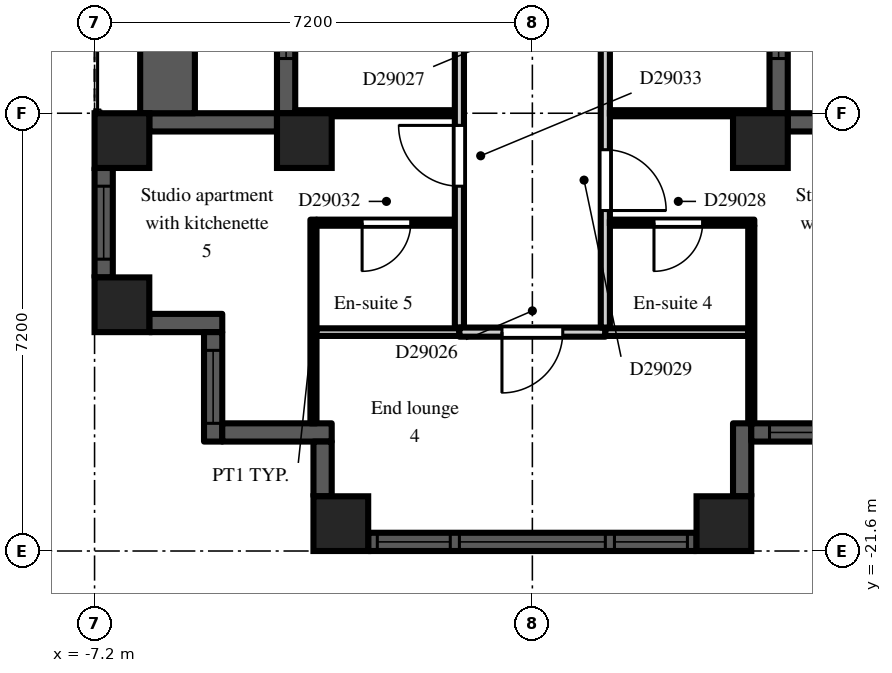
"""IFC4 building model, lengths in metres.
Left out: names, types, materials, properties, quantities, classifications, styles, units other than length and angle.
Written with IfcOpenShell. Run it as: python <this file> out.ifc"""

import sys

from ifc_helpers import new_model, si_unit, direction, frame, frame_2d, origin, origin_2d, place, context, subcontext, project, spatial, rectangle, extrude, element, fill, save


model = new_model("IFC4")
c1 = context("Model", 3, precision=1e-05, world=origin(), true_north=direction((0.0, 1.0)))
c2 = subcontext(c1, "Body", "Model", "MODEL_VIEW")
j1 = project(units=[si_unit("LENGTHUNIT", "METRE"), si_unit("PLANEANGLEUNIT", "RADIAN")], contexts=[c1])
p1 = place(None, origin())
s1 = spatial("IfcSite", under=j1, at=p1, CompositionType="ELEMENT")
p2 = place(p1, origin())
s2 = spatial("IfcBuilding", under=s1, at=p2, CompositionType="ELEMENT")
p3 = place(p2, frame((0.0, 0.0, 198.9)))
s3 = spatial("IfcBuildingStorey", under=s2, at=p3, CompositionType="ELEMENT", Elevation=198.9)
for number, where, z_axis, x_axis in (
    (1, (-6.75, -17.55, 0.0), (0.0, 0.0, 1.0), (1.0, 0.0, 0.0)),
    (2, (-6.75, -14.85, 0.0), (0.0, 0.0, 1.0), (1.0, 0.0, 0.0)),
    (3, (-3.75, -14.85, 0.0), (0.0, 0.0, 1.0), (1.0, 0.0, 0.0)),
    (4, (-3.15, -21.15, 0.0), (0.0, 0.0, 1.0), (1.0, 0.0, 0.0)),
    (5, (3.15, -21.15, 0.0), (0.0, 0.0, 1.0), (1.0, 0.0, 0.0)),
    (6, (3.75, -14.85, 0.0), (0.0, 0.0, 1.0), (1.0, 0.0, 0.0)),
):
    element("IfcColumn", number, at=place(p3, frame(where, z_axis=z_axis, x_axis=x_axis)), inside=s3, PredefinedType="COLUMN", context=c2, shape_type="SweptSolid", body=[
        extrude(rectangle(XDim=0.9, YDim=0.9, at=origin_2d()), origin(), (0.0, 0.0, 1.0), 3.0),
    ])
p4 = place(p3, frame((-4.05, -7.2, 0.0), z_axis=(0.0, 0.0, 1.0), x_axis=(0.0, -1.0, 0.0)))
e7 = element("IfcWall", 7, at=p4, inside=s3, PredefinedType="SOLIDWALL", context=c2, shape_type="SweptSolid", body=[
    extrude(rectangle(XDim=7.2, YDim=0.3, at=frame_2d((3.6, 0.0))), origin(), (0.0, 0.0, 1.0), 2.3),
])
p5 = place(p4, frame((3.0, 0.0, 0.0)))
e8 = element("IfcOpeningElement", 8, at=p5, cuts=e7, PredefinedType="OPENING", context=c2, shape_type="SweptSolid", body=[
    extrude(rectangle(XDim=1.2, YDim=2.05, at=frame_2d((0.6, 1.025))), frame((0.0, 0.16, 0.0), z_axis=(0.0, -1.0, 0.0), x_axis=(1.0, 0.0, 0.0)), (0.0, 0.0, 1.0), 0.32),
])
p6 = place(p4, frame((0.9, 0.0, 0.2)))
e9 = element("IfcOpeningElement", 9, at=p6, cuts=e7, PredefinedType="OPENING", context=c2, shape_type="SweptSolid", body=[
    extrude(rectangle(XDim=1.8, YDim=1.85, at=frame_2d((0.9, 0.925))), frame((0.0, 0.16, 0.0), z_axis=(0.0, -1.0, 0.0), x_axis=(1.0, 0.0, 0.0)), (0.0, 0.0, 1.0), 0.32),
])
p7 = place(p4, frame((4.5, 0.0, 0.2)))
e10 = element("IfcOpeningElement", 10, at=p7, cuts=e7, PredefinedType="OPENING", context=c2, shape_type="SweptSolid", body=[
    extrude(rectangle(XDim=1.8, YDim=1.85, at=frame_2d((0.9, 0.925))), frame((0.0, 0.16, 0.0), z_axis=(0.0, -1.0, 0.0), x_axis=(1.0, 0.0, 0.0)), (0.0, 0.0, 1.0), 0.32),
])
p8 = place(p3, frame((-4.2, -14.55, 0.0), z_axis=(0.0, 0.0, 1.0), x_axis=(-1.0, 0.0, 0.0)))
e11 = element("IfcWall", 11, at=p8, inside=s3, PredefinedType="SOLIDWALL", context=c2, shape_type="SweptSolid", body=[
    extrude(rectangle(XDim=2.1, YDim=0.3, at=frame_2d((1.05, 0.0))), origin(), (0.0, 0.0, 1.0), 2.3),
])
p9 = place(p3, frame((-7.05, -15.3, 0.0), z_axis=(0.0, 0.0, 1.0), x_axis=(0.0, -1.0, 0.0)))
e12 = element("IfcWall", 12, at=p9, inside=s3, PredefinedType="SOLIDWALL", context=c2, shape_type="SweptSolid", body=[
    extrude(rectangle(XDim=1.8, YDim=0.3, at=frame_2d((0.9, 0.0))), origin(), (0.0, 0.0, 1.0), 2.3),
])
p10 = place(p9, frame((0.3, 0.0, 0.2)))
e13 = element("IfcOpeningElement", 13, at=p10, cuts=e12, PredefinedType="OPENING", context=c2, shape_type="SweptSolid", body=[
    extrude(rectangle(XDim=1.2, YDim=1.85, at=frame_2d((0.6, 0.925))), frame((0.0, 0.16, 0.0), z_axis=(0.0, -1.0, 0.0), x_axis=(1.0, 0.0, 0.0)), (0.0, 0.0, 1.0), 0.32),
])
p11 = place(p3, frame((-6.3, -17.85, 0.0), z_axis=(0.0, 0.0, 1.0), x_axis=(1.0, 0.0, 0.0)))
e14 = element("IfcWall", 14, at=p11, inside=s3, PredefinedType="SOLIDWALL", context=c2, shape_type="SweptSolid", body=[
    extrude(rectangle(XDim=1.2, YDim=0.3, at=frame_2d((0.6, 0.0))), origin(), (0.0, 0.0, 1.0), 2.6),
])
p12 = place(p3, frame((-5.25, -18.0, 0.0), z_axis=(0.0, 0.0, 1.0), x_axis=(0.0, -1.0, 0.0)))
e15 = element("IfcWall", 15, at=p12, inside=s3, PredefinedType="SOLIDWALL", context=c2, shape_type="SweptSolid", body=[
    extrude(rectangle(XDim=1.8, YDim=0.3, at=frame_2d((0.9, 0.0))), origin(), (0.0, 0.0, 1.0), 2.6),
])
p13 = place(p12, frame((0.3, 0.0, 0.2)))
e16 = element("IfcOpeningElement", 16, at=p13, cuts=e15, PredefinedType="OPENING", context=c2, shape_type="SweptSolid", body=[
    extrude(rectangle(XDim=1.2, YDim=1.85, at=frame_2d((0.6, 0.925))), frame((0.0, 0.16, 0.0), z_axis=(0.0, -1.0, 0.0), x_axis=(1.0, 0.0, 0.0)), (0.0, 0.0, 1.0), 0.32),
])
p14 = place(p3, frame((-5.1, -19.65, 0.0), z_axis=(0.0, 0.0, 1.0), x_axis=(1.0, 0.0, 0.0)))
e17 = element("IfcWall", 17, at=p14, inside=s3, PredefinedType="SOLIDWALL", context=c2, shape_type="SweptSolid", body=[
    extrude(rectangle(XDim=1.8, YDim=0.3, at=frame_2d((0.9, 0.0))), origin(), (0.0, 0.0, 1.0), 2.6),
])
p15 = place(p3, frame((-3.45, -19.8, 0.0), z_axis=(0.0, 0.0, 1.0), x_axis=(0.0, -1.0, 0.0)))
e18 = element("IfcWall", 18, at=p15, inside=s3, PredefinedType="SOLIDWALL", context=c2, shape_type="SweptSolid", body=[
    extrude(rectangle(XDim=0.9, YDim=0.3, at=frame_2d((0.45, 0.0))), origin(), (0.0, 0.0, 1.0), 2.6),
])
p16 = place(p3, frame((-2.7, -21.45, 0.0), z_axis=(0.0, 0.0, 1.0), x_axis=(1.0, 0.0, 0.0)))
e19 = element("IfcWall", 19, at=p16, inside=s3, PredefinedType="SOLIDWALL", context=c2, shape_type="SweptSolid", body=[
    extrude(rectangle(XDim=5.4, YDim=0.3, at=frame_2d((2.7, 0.0))), origin(), (0.0, 0.0, 1.0), 2.3),
])
p17 = place(p16, frame((1.5, 0.0, 0.2)))
e20 = element("IfcOpeningElement", 20, at=p17, cuts=e19, PredefinedType="OPENING", context=c2, shape_type="SweptSolid", body=[
    extrude(rectangle(XDim=2.4, YDim=1.85, at=frame_2d((1.2, 0.925))), frame((0.0, 0.16, 0.0), z_axis=(0.0, -1.0, 0.0), x_axis=(1.0, 0.0, 0.0)), (0.0, 0.0, 1.0), 0.32),
])
p18 = place(p16, frame((0.15, 0.0, 0.2)))
e21 = element("IfcOpeningElement", 21, at=p18, cuts=e19, PredefinedType="OPENING", context=c2, shape_type="SweptSolid", body=[
    extrude(rectangle(XDim=1.2, YDim=1.85, at=frame_2d((0.6, 0.925))), frame((0.0, 0.16, 0.0), z_axis=(0.0, -1.0, 0.0), x_axis=(1.0, 0.0, 0.0)), (0.0, 0.0, 1.0), 0.32),
])
p19 = place(p16, frame((4.05, 0.0, 0.2)))
e22 = element("IfcOpeningElement", 22, at=p19, cuts=e19, PredefinedType="OPENING", context=c2, shape_type="SweptSolid", body=[
    extrude(rectangle(XDim=1.2, YDim=1.85, at=frame_2d((0.6, 0.925))), frame((0.0, 0.16, 0.0), z_axis=(0.0, -1.0, 0.0), x_axis=(1.0, 0.0, 0.0)), (0.0, 0.0, 1.0), 0.32),
])
p20 = place(p3, frame((3.45, -20.7, 0.0), z_axis=(0.0, 0.0, 1.0), x_axis=(0.0, 1.0, 0.0)))
e23 = element("IfcWall", 23, at=p20, inside=s3, PredefinedType="SOLIDWALL", context=c2, shape_type="SweptSolid", body=[
    extrude(rectangle(XDim=1.2, YDim=0.3, at=frame_2d((0.6, 0.0))), origin(), (0.0, 0.0, 1.0), 2.6),
])
p21 = place(p3, frame((3.6, -19.65, 0.0), z_axis=(0.0, 0.0, 1.0), x_axis=(1.0, 0.0, 0.0)))
e24 = element("IfcWall", 24, at=p21, inside=s3, PredefinedType="SOLIDWALL", context=c2, shape_type="SweptSolid", body=[
    extrude(rectangle(XDim=1.8, YDim=0.3, at=frame_2d((0.9, 0.0))), origin(), (0.0, 0.0, 1.0), 2.6),
])
p22 = place(p21, frame((0.3, 0.0, 0.2)))
e25 = element("IfcOpeningElement", 25, at=p22, cuts=e24, PredefinedType="OPENING", context=c2, shape_type="SweptSolid", body=[
    extrude(rectangle(XDim=1.2, YDim=1.85, at=frame_2d((0.6, 0.925))), frame((0.0, 0.16, 0.0), z_axis=(0.0, -1.0, 0.0), x_axis=(1.0, 0.0, 0.0)), (0.0, 0.0, 1.0), 0.32),
])
p23 = place(p3, frame((6.3, -14.55, 0.0), z_axis=(0.0, 0.0, 1.0), x_axis=(-1.0, 0.0, 0.0)))
e26 = element("IfcWall", 26, at=p23, inside=s3, PredefinedType="SOLIDWALL", context=c2, shape_type="SweptSolid", body=[
    extrude(rectangle(XDim=2.1, YDim=0.3, at=frame_2d((1.05, 0.0))), origin(), (0.0, 0.0, 1.0), 2.3),
])
p24 = place(p3, frame((4.05, -14.4, 0.0), z_axis=(0.0, 0.0, 1.0), x_axis=(0.0, 1.0, 0.0)))
e27 = element("IfcWall", 27, at=p24, inside=s3, PredefinedType="SOLIDWALL", context=c2, shape_type="SweptSolid", body=[
    extrude(rectangle(XDim=7.2, YDim=0.3, at=frame_2d((3.6, 0.0))), origin(), (0.0, 0.0, 1.0), 2.3),
])
p25 = place(p24, frame((3.0, 0.0, 0.0)))
e28 = element("IfcOpeningElement", 28, at=p25, cuts=e27, PredefinedType="OPENING", context=c2, shape_type="SweptSolid", body=[
    extrude(rectangle(XDim=1.2, YDim=2.05, at=frame_2d((0.6, 1.025))), frame((0.0, 0.16, 0.0), z_axis=(0.0, -1.0, 0.0), x_axis=(1.0, 0.0, 0.0)), (0.0, 0.0, 1.0), 0.32),
])
p26 = place(p24, frame((0.9, 0.0, 0.2)))
e29 = element("IfcOpeningElement", 29, at=p26, cuts=e27, PredefinedType="OPENING", context=c2, shape_type="SweptSolid", body=[
    extrude(rectangle(XDim=1.8, YDim=1.85, at=frame_2d((0.9, 0.925))), frame((0.0, 0.16, 0.0), z_axis=(0.0, -1.0, 0.0), x_axis=(1.0, 0.0, 0.0)), (0.0, 0.0, 1.0), 0.32),
])
p27 = place(p24, frame((4.5, 0.0, 0.2)))
e30 = element("IfcOpeningElement", 30, at=p27, cuts=e27, PredefinedType="OPENING", context=c2, shape_type="SweptSolid", body=[
    extrude(rectangle(XDim=1.8, YDim=1.85, at=frame_2d((0.9, 0.925))), frame((0.0, 0.16, 0.0), z_axis=(0.0, -1.0, 0.0), x_axis=(1.0, 0.0, 0.0)), (0.0, 0.0, 1.0), 0.32),
])
p28 = place(p3, frame((-6.0, -14.4, 0.0), z_axis=(0.0, 0.0, 1.0), x_axis=(0.0, 1.0, 0.0)))
e31 = element("IfcWall", 31, at=p28, inside=s3, PredefinedType="PARAPET", context=c2, shape_type="SweptSolid", body=[
    extrude(rectangle(XDim=7.2, YDim=0.9, at=frame_2d((3.6, 0.0))), origin(), (0.0, 0.0, 1.0), 0.8),
])
p29 = place(p3, frame((-3.9, -14.4, 0.0), z_axis=(0.0, 0.0, 1.0), x_axis=(1.0, 0.0, 0.0)))
e32 = element("IfcWall", 32, at=p29, inside=s3, PredefinedType="PARTITIONING", context=c2, shape_type="SweptSolid", body=[
    extrude(rectangle(XDim=2.625, YDim=0.1, at=frame_2d((1.312, 0.0))), origin(), (0.0, 0.0, 1.0), 2.6),
])
p30 = place(p3, frame((-3.6, -19.5, 0.0), z_axis=(0.0, 0.0, 1.0), x_axis=(0.0, 1.0, 0.0)))
e33 = element("IfcWall", 33, at=p30, inside=s3, PredefinedType="PARTITIONING", context=c2, shape_type="SweptSolid", body=[
    extrude(rectangle(XDim=3.35, YDim=0.1, at=frame_2d((1.675, 0.0))), origin(), (0.0, 0.0, 1.0), 2.6),
])
p31 = place(p3, frame((-3.55, -18.0, 0.0), z_axis=(0.0, 0.0, 1.0), x_axis=(1.0, 0.0, 0.0)))
e34 = element("IfcWall", 34, at=p31, inside=s3, PredefinedType="PARTITIONING", context=c2, shape_type="SweptSolid", body=[
    extrude(rectangle(XDim=2.35, YDim=0.125, at=frame_2d((1.175, 0.0))), origin(), (0.0, 0.0, 1.0), 2.6),
])
p32 = place(p3, frame((-3.55, -16.2, 0.0), z_axis=(0.0, 0.0, 1.0), x_axis=(1.0, 0.0, 0.0)))
e35 = element("IfcWall", 35, at=p32, inside=s3, PredefinedType="PARTITIONING", context=c2, shape_type="SweptSolid", body=[
    extrude(rectangle(XDim=2.275, YDim=0.1, at=frame_2d((1.138, 0.0))), origin(), (0.0, 0.0, 1.0), 2.6),
])
p33 = place(p32, frame((0.75, 0.0, 0.0)))
e36 = element("IfcOpeningElement", 36, at=p33, cuts=e35, PredefinedType="OPENING", context=c2, shape_type="SweptSolid", body=[
    extrude(rectangle(XDim=0.8, YDim=2.1, at=frame_2d((0.4, 1.05))), frame((0.0, 0.06, 0.0), z_axis=(0.0, -1.0, 0.0), x_axis=(1.0, 0.0, 0.0)), (0.0, 0.0, 1.0), 0.12),
])
p34 = place(p3, frame((-1.2, -17.925, 0.0), z_axis=(0.0, 0.0, 1.0), x_axis=(0.0, 1.0, 0.0)))
e37 = element("IfcWall", 37, at=p34, inside=s3, PredefinedType="PARTITIONING", context=c2, shape_type="SweptSolid", body=[
    extrude(rectangle(XDim=16.65, YDim=0.15, at=frame_2d((8.325, 0.0))), origin(), (0.0, 0.0, 1.0), 2.6),
])
p35 = place(p34, frame((12.175, 0.0, 0.0)))
e38 = element("IfcOpeningElement", 38, at=p35, cuts=e37, PredefinedType="OPENING", context=c2, shape_type="SweptSolid", body=[
    extrude(rectangle(XDim=0.9, YDim=2.1, at=frame_2d((0.45, 1.05))), frame((0.0, 0.085, 0.0), z_axis=(0.0, -1.0, 0.0), x_axis=(1.0, 0.0, 0.0)), (0.0, 0.0, 1.0), 0.17),
])
p36 = place(p34, frame((8.875, 0.0, 0.0)))
e39 = element("IfcOpeningElement", 39, at=p36, cuts=e37, PredefinedType="OPENING", context=c2, shape_type="SweptSolid", body=[
    extrude(rectangle(XDim=0.9, YDim=2.1, at=frame_2d((0.45, 1.05))), frame((0.0, 0.085, 0.0), z_axis=(0.0, -1.0, 0.0), x_axis=(1.0, 0.0, 0.0)), (0.0, 0.0, 1.0), 0.17),
])
p37 = place(p34, frame((5.275, 0.0, 0.0)))
e40 = element("IfcOpeningElement", 40, at=p37, cuts=e37, PredefinedType="OPENING", context=c2, shape_type="SweptSolid", body=[
    extrude(rectangle(XDim=0.9, YDim=2.1, at=frame_2d((0.45, 1.05))), frame((0.0, 0.085, 0.0), z_axis=(0.0, -1.0, 0.0), x_axis=(1.0, 0.0, 0.0)), (0.0, 0.0, 1.0), 0.17),
])
p38 = place(p34, frame((2.325, 0.0, 0.0)))
e41 = element("IfcOpeningElement", 41, at=p38, cuts=e37, PredefinedType="OPENING", context=c2, shape_type="SweptSolid", body=[
    extrude(rectangle(XDim=1.0, YDim=2.1, at=frame_2d((0.5, 1.05))), frame((0.0, 0.085, 0.0), z_axis=(0.0, -1.0, 0.0), x_axis=(1.0, 0.0, 0.0)), (0.0, 0.0, 1.0), 0.17),
])
p39 = place(p3, frame((-1.2, -18.0, 0.0), z_axis=(0.0, 0.0, 1.0), x_axis=(1.0, 0.0, 0.0)))
e42 = element("IfcWall", 42, at=p39, inside=s3, PredefinedType="PARTITIONING", context=c2, shape_type="SweptSolid", body=[
    extrude(rectangle(XDim=2.4, YDim=0.15, at=frame_2d((1.2, 0.0))), origin(), (0.0, 0.0, 1.0), 2.6),
])
p40 = place(p39, frame((0.7, 0.0, 0.0)))
e43 = element("IfcOpeningElement", 43, at=p40, cuts=e42, PredefinedType="OPENING", context=c2, shape_type="SweptSolid", body=[
    extrude(rectangle(XDim=1.0, YDim=2.1, at=frame_2d((0.5, 1.05))), frame((0.0, 0.085, 0.0), z_axis=(0.0, -1.0, 0.0), x_axis=(1.0, 0.0, 0.0)), (0.0, 0.0, 1.0), 0.17),
])
p41 = place(p3, frame((1.2, -17.925, 0.0), z_axis=(0.0, 0.0, 1.0), x_axis=(0.0, 1.0, 0.0)))
e44 = element("IfcWall", 44, at=p41, inside=s3, PredefinedType="PARTITIONING", context=c2, shape_type="SweptSolid", body=[
    extrude(rectangle(XDim=16.8, YDim=0.15, at=frame_2d((8.4, 0.0))), origin(), (0.0, 0.0, 1.0), 2.6),
])
p42 = place(p41, frame((15.075, 0.0, 0.0)))
e45 = element("IfcOpeningElement", 45, at=p42, cuts=e44, PredefinedType="OPENING", context=c2, shape_type="SweptSolid", body=[
    extrude(rectangle(XDim=0.9, YDim=2.1, at=frame_2d((0.45, 1.05))), frame((0.0, 0.085, 0.0), z_axis=(0.0, -1.0, 0.0), x_axis=(1.0, 0.0, 0.0)), (0.0, 0.0, 1.0), 0.17),
])
p43 = place(p41, frame((12.075, 0.0, 0.0)))
e46 = element("IfcOpeningElement", 46, at=p43, cuts=e44, PredefinedType="OPENING", context=c2, shape_type="SweptSolid", body=[
    extrude(rectangle(XDim=0.9, YDim=2.1, at=frame_2d((0.45, 1.05))), frame((0.0, 0.085, 0.0), z_axis=(0.0, -1.0, 0.0), x_axis=(1.0, 0.0, 0.0)), (0.0, 0.0, 1.0), 0.17),
])
p44 = place(p41, frame((4.875, 0.0, 0.0)))
e47 = element("IfcOpeningElement", 47, at=p44, cuts=e44, PredefinedType="OPENING", context=c2, shape_type="SweptSolid", body=[
    extrude(rectangle(XDim=0.9, YDim=2.1, at=frame_2d((0.45, 1.05))), frame((0.0, 0.085, 0.0), z_axis=(0.0, -1.0, 0.0), x_axis=(1.0, 0.0, 0.0)), (0.0, 0.0, 1.0), 0.17),
])
p45 = place(p41, frame((1.925, 0.0, 0.0)))
e48 = element("IfcOpeningElement", 48, at=p45, cuts=e44, PredefinedType="OPENING", context=c2, shape_type="SweptSolid", body=[
    extrude(rectangle(XDim=1.0, YDim=2.1, at=frame_2d((0.5, 1.05))), frame((0.0, 0.085, 0.0), z_axis=(0.0, -1.0, 0.0), x_axis=(1.0, 0.0, 0.0)), (0.0, 0.0, 1.0), 0.17),
])
p46 = place(p3, frame((1.2, -18.0, 0.0), z_axis=(0.0, 0.0, 1.0), x_axis=(1.0, 0.0, 0.0)))
e49 = element("IfcWall", 49, at=p46, inside=s3, PredefinedType="PARTITIONING", context=c2, shape_type="SweptSolid", body=[
    extrude(rectangle(XDim=2.35, YDim=0.125, at=frame_2d((1.175, 0.0))), origin(), (0.0, 0.0, 1.0), 2.6),
])
p47 = place(p3, frame((1.275, -16.2, 0.0), z_axis=(0.0, 0.0, 1.0), x_axis=(1.0, 0.0, 0.0)))
e50 = element("IfcWall", 50, at=p47, inside=s3, PredefinedType="PARTITIONING", context=c2, shape_type="SweptSolid", body=[
    extrude(rectangle(XDim=2.375, YDim=0.1, at=frame_2d((1.188, 0.0))), origin(), (0.0, 0.0, 1.0), 2.6),
])
p48 = place(p47, frame((0.725, 0.0, 0.0)))
e51 = element("IfcOpeningElement", 51, at=p48, cuts=e50, PredefinedType="OPENING", context=c2, shape_type="SweptSolid", body=[
    extrude(rectangle(XDim=0.8, YDim=2.1, at=frame_2d((0.4, 1.05))), frame((0.0, 0.06, 0.0), z_axis=(0.0, -1.0, 0.0), x_axis=(1.0, 0.0, 0.0)), (0.0, 0.0, 1.0), 0.12),
])
p49 = place(p3, frame((1.275, -14.4, 0.0), z_axis=(0.0, 0.0, 1.0), x_axis=(1.0, 0.0, 0.0)))
e52 = element("IfcWall", 52, at=p49, inside=s3, PredefinedType="PARTITIONING", context=c2, shape_type="SweptSolid", body=[
    extrude(rectangle(XDim=2.625, YDim=0.1, at=frame_2d((1.312, 0.0))), origin(), (0.0, 0.0, 1.0), 2.6),
])
p50 = place(p3, frame((3.6, -19.5, 0.0), z_axis=(0.0, 0.0, 1.0), x_axis=(0.0, 1.0, 0.0)))
e53 = element("IfcWall", 53, at=p50, inside=s3, PredefinedType="PARTITIONING", context=c2, shape_type="SweptSolid", body=[
    extrude(rectangle(XDim=3.25, YDim=0.1, at=frame_2d((1.625, 0.0))), origin(), (0.0, 0.0, 1.0), 2.6),
])
p51 = place(p7, origin())
e54 = element("IfcWindow", 54, at=p51, inside=s3, PartitioningType="SINGLE_PANEL", PredefinedType="WINDOW", context=c2, shape_type="SweptSolid", body=[
    extrude(rectangle(XDim=1.8, YDim=1.85, at=frame_2d((0.9, 0.925))), frame((0.0, 0.03, 0.0), z_axis=(0.0, -1.0, 0.0), x_axis=(1.0, 0.0, 0.0)), (0.0, 0.0, 1.0), 0.06),
])
fill(e10, e54)
p52 = place(p10, origin())
e55 = element("IfcWindow", 55, at=p52, inside=s3, PartitioningType="SINGLE_PANEL", PredefinedType="WINDOW", context=c2, shape_type="SweptSolid", body=[
    extrude(rectangle(XDim=1.2, YDim=1.85, at=frame_2d((0.6, 0.925))), frame((0.0, 0.03, 0.0), z_axis=(0.0, -1.0, 0.0), x_axis=(1.0, 0.0, 0.0)), (0.0, 0.0, 1.0), 0.06),
])
fill(e13, e55)
p53 = place(p13, origin())
e56 = element("IfcWindow", 56, at=p53, inside=s3, PartitioningType="SINGLE_PANEL", PredefinedType="WINDOW", context=c2, shape_type="SweptSolid", body=[
    extrude(rectangle(XDim=1.2, YDim=1.85, at=frame_2d((0.6, 0.925))), frame((0.0, 0.03, 0.0), z_axis=(0.0, -1.0, 0.0), x_axis=(1.0, 0.0, 0.0)), (0.0, 0.0, 1.0), 0.06),
])
fill(e16, e56)
p54 = place(p17, origin())
e57 = element("IfcWindow", 57, at=p54, inside=s3, PartitioningType="SINGLE_PANEL", PredefinedType="WINDOW", context=c2, shape_type="SweptSolid", body=[
    extrude(rectangle(XDim=2.4, YDim=1.85, at=frame_2d((1.2, 0.925))), frame((0.0, 0.03, 0.0), z_axis=(0.0, -1.0, 0.0), x_axis=(1.0, 0.0, 0.0)), (0.0, 0.0, 1.0), 0.06),
])
fill(e20, e57)
p55 = place(p18, origin())
e58 = element("IfcWindow", 58, at=p55, inside=s3, PartitioningType="SINGLE_PANEL", PredefinedType="WINDOW", context=c2, shape_type="SweptSolid", body=[
    extrude(rectangle(XDim=1.2, YDim=1.85, at=frame_2d((0.6, 0.925))), frame((0.0, 0.03, 0.0), z_axis=(0.0, -1.0, 0.0), x_axis=(1.0, 0.0, 0.0)), (0.0, 0.0, 1.0), 0.06),
])
fill(e21, e58)
p56 = place(p19, origin())
e59 = element("IfcWindow", 59, at=p56, inside=s3, PartitioningType="SINGLE_PANEL", PredefinedType="WINDOW", context=c2, shape_type="SweptSolid", body=[
    extrude(rectangle(XDim=1.2, YDim=1.85, at=frame_2d((0.6, 0.925))), frame((0.0, 0.03, 0.0), z_axis=(0.0, -1.0, 0.0), x_axis=(1.0, 0.0, 0.0)), (0.0, 0.0, 1.0), 0.06),
])
fill(e22, e59)
p57 = place(p22, origin())
e60 = element("IfcWindow", 60, at=p57, inside=s3, PartitioningType="SINGLE_PANEL", PredefinedType="WINDOW", context=c2, shape_type="SweptSolid", body=[
    extrude(rectangle(XDim=1.2, YDim=1.85, at=frame_2d((0.6, 0.925))), frame((0.0, 0.03, 0.0), z_axis=(0.0, -1.0, 0.0), x_axis=(1.0, 0.0, 0.0)), (0.0, 0.0, 1.0), 0.06),
])
fill(e25, e60)
p58 = place(p26, origin())
e61 = element("IfcWindow", 61, at=p58, inside=s3, PartitioningType="SINGLE_PANEL", PredefinedType="WINDOW", context=c2, shape_type="SweptSolid", body=[
    extrude(rectangle(XDim=1.8, YDim=1.85, at=frame_2d((0.9, 0.925))), frame((0.0, 0.03, 0.0), z_axis=(0.0, -1.0, 0.0), x_axis=(1.0, 0.0, 0.0)), (0.0, 0.0, 1.0), 0.06),
])
fill(e29, e61)
p59 = place(p40, frame((1.0, 0.0, 0.0), z_axis=(0.0, 0.0, 1.0), x_axis=(-1.0, 0.0, 0.0)))
e62 = element("IfcDoor", 62, at=p59, inside=s3, OperationType="SINGLE_SWING_RIGHT", PredefinedType="DOOR", context=c2, shape_type="SweptSolid", body=[
    extrude(rectangle(XDim=1.0, YDim=2.1, at=frame_2d((0.5, 1.05))), frame((0.0, 0.025, 0.0), z_axis=(0.0, -1.0, 0.0), x_axis=(1.0, 0.0, 0.0)), (0.0, 0.0, 1.0), 0.05),
])
fill(e43, e62)
p60 = place(p48, frame((0.8, 0.0, 0.0), z_axis=(0.0, 0.0, 1.0), x_axis=(-1.0, 0.0, 0.0)))
e63 = element("IfcDoor", 63, at=p60, inside=s3, OperationType="SINGLE_SWING_RIGHT", PredefinedType="DOOR", context=c2, shape_type="SweptSolid", body=[
    extrude(rectangle(XDim=0.8, YDim=2.1, at=frame_2d((0.4, 1.05))), frame((0.0, 0.025, 0.0), z_axis=(0.0, -1.0, 0.0), x_axis=(1.0, 0.0, 0.0)), (0.0, 0.0, 1.0), 0.05),
])
fill(e51, e63)
p61 = place(p45, frame((1.0, 0.0, 0.0), z_axis=(0.0, 0.0, 1.0), x_axis=(-1.0, 0.0, 0.0)))
e64 = element("IfcDoor", 64, at=p61, inside=s3, OperationType="SINGLE_SWING_RIGHT", PredefinedType="DOOR", context=c2, shape_type="SweptSolid", body=[
    extrude(rectangle(XDim=1.0, YDim=2.1, at=frame_2d((0.5, 1.05))), frame((0.0, 0.025, 0.0), z_axis=(0.0, -1.0, 0.0), x_axis=(1.0, 0.0, 0.0)), (0.0, 0.0, 1.0), 0.05),
])
fill(e48, e64)
p62 = place(p33, frame((0.8, 0.0, 0.0), z_axis=(0.0, 0.0, 1.0), x_axis=(-1.0, 0.0, 0.0)))
e65 = element("IfcDoor", 65, at=p62, inside=s3, OperationType="SINGLE_SWING_RIGHT", PredefinedType="DOOR", context=c2, shape_type="SweptSolid", body=[
    extrude(rectangle(XDim=0.8, YDim=2.1, at=frame_2d((0.4, 1.05))), frame((0.0, 0.025, 0.0), z_axis=(0.0, -1.0, 0.0), x_axis=(1.0, 0.0, 0.0)), (0.0, 0.0, 1.0), 0.05),
])
fill(e36, e65)
p63 = place(p38, origin())
e66 = element("IfcDoor", 66, at=p63, inside=s3, OperationType="SINGLE_SWING_RIGHT", PredefinedType="DOOR", context=c2, shape_type="SweptSolid", body=[
    extrude(rectangle(XDim=1.0, YDim=2.1, at=frame_2d((0.5, 1.05))), frame((0.0, 0.025, 0.0), z_axis=(0.0, -1.0, 0.0), x_axis=(1.0, 0.0, 0.0)), (0.0, 0.0, 1.0), 0.05),
])
fill(e41, e66)
save(model, sys.argv[1])
